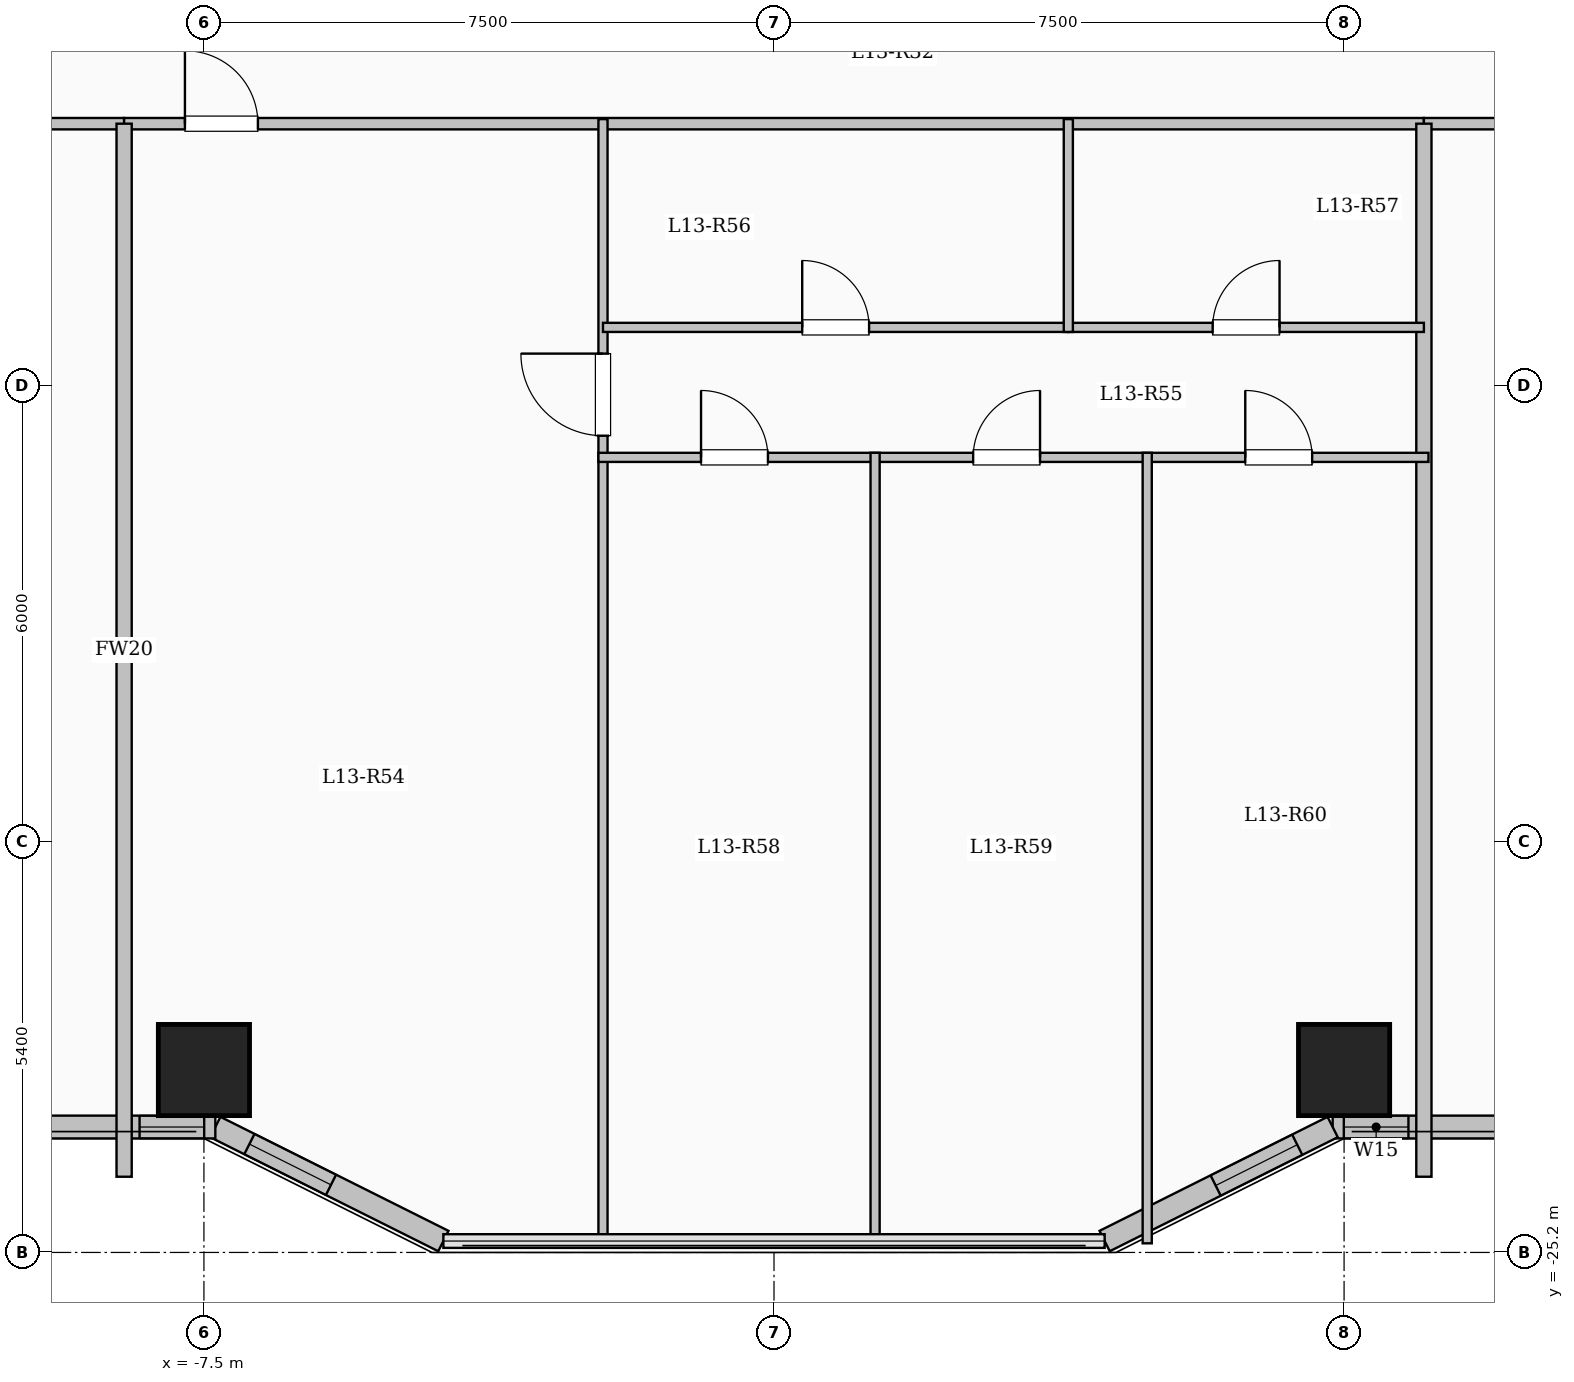
"""IFC4 building model, lengths in metres.
Left out: names, types, materials, properties, quantities, classifications, styles, units other than length and angle.
Written with IfcOpenShell. Run it as: python <this file> out.ifc"""

import sys

from ifc_helpers import new_model, si_unit, direction, frame, frame_2d, origin, origin_2d, place, context, subcontext, project, spatial, rectangle, extrude, element, fill, save


model = new_model("IFC4")
c1 = context("Model", 3, precision=1e-05, world=origin(), true_north=direction((0.0, 1.0)))
c2 = subcontext(c1, "Body", "Model", "MODEL_VIEW")
j1 = project(units=[si_unit("LENGTHUNIT", "METRE"), si_unit("PLANEANGLEUNIT", "RADIAN")], contexts=[c1])
p1 = place(None, origin())
s1 = spatial("IfcSite", under=j1, at=p1, CompositionType="ELEMENT")
p2 = place(p1, origin())
s2 = spatial("IfcBuilding", under=s1, at=p2, CompositionType="ELEMENT")
p3 = place(p2, frame((0.0, 0.0, 50.8)))
s3 = spatial("IfcBuildingStorey", under=s2, at=p3, CompositionType="ELEMENT", Elevation=50.8)
for number, where, z_axis, x_axis in (
    (1, (-7.5, -22.8, 0.0), (0.0, 0.0, 1.0), (1.0, 0.0, 0.0)),
    (2, (7.5, -22.8, 0.0), (0.0, 0.0, 1.0), (1.0, 0.0, 0.0)),
):
    element("IfcColumn", number, at=place(p3, frame(where, z_axis=z_axis, x_axis=x_axis)), inside=s3, PredefinedType="COLUMN", context=c2, shape_type="SweptSolid", body=[
        extrude(rectangle(XDim=1.2, YDim=1.2, at=origin_2d()), origin(), (0.0, 0.0, 1.0), 3.35),
    ])
p4 = place(p3, frame((22.65, -23.55, 0.0), z_axis=(0.0, 0.0, 1.0), x_axis=(-1.0, 0.0, 0.0)))
e3 = element("IfcWall", 3, at=p4, inside=s3, PredefinedType="SOLIDWALL", context=c2, shape_type="SweptSolid", body=[
    extrude(rectangle(XDim=15.3, YDim=0.3, at=frame_2d((7.65, 0.0))), origin(), (0.0, 0.0, 1.0), 3.1),
])
p5 = place(p4, frame((1.007, 0.0, 0.9)))
e4 = element("IfcOpeningElement", 4, at=p5, cuts=e3, PredefinedType="OPENING", context=c2, shape_type="SweptSolid", body=[
    extrude(rectangle(XDim=2.0, YDim=1.7, at=frame_2d((1.0, 0.85))), frame((0.0, 0.16, 0.0), z_axis=(0.0, -1.0, 0.0), x_axis=(1.0, 0.0, 0.0)), (0.0, 0.0, 1.0), 0.32),
])
p6 = place(p4, frame((5.496, 0.0, 0.9)))
e5 = element("IfcOpeningElement", 5, at=p6, cuts=e3, PredefinedType="OPENING", context=c2, shape_type="SweptSolid", body=[
    extrude(rectangle(XDim=2.0, YDim=1.7, at=frame_2d((1.0, 0.85))), frame((0.0, 0.16, 0.0), z_axis=(0.0, -1.0, 0.0), x_axis=(1.0, 0.0, 0.0)), (0.0, 0.0, 1.0), 0.32),
])
p7 = place(p4, frame((10.563, 0.0, 0.9)))
e6 = element("IfcOpeningElement", 6, at=p7, cuts=e3, PredefinedType="OPENING", context=c2, shape_type="SweptSolid", body=[
    extrude(rectangle(XDim=2.0, YDim=1.7, at=frame_2d((1.0, 0.85))), frame((0.0, 0.16, 0.0), z_axis=(0.0, -1.0, 0.0), x_axis=(1.0, 0.0, 0.0)), (0.0, 0.0, 1.0), 0.32),
])
p8 = place(p4, frame((14.303, 0.0, 0.95)))
e7 = element("IfcOpeningElement", 7, at=p8, cuts=e3, PredefinedType="OPENING", context=c2, shape_type="SweptSolid", body=[
    extrude(rectangle(XDim=0.85, YDim=1.5, at=frame_2d((0.425, 0.75))), frame((0.0, 0.16, 0.0), z_axis=(0.0, -1.0, 0.0), x_axis=(1.0, 0.0, 0.0)), (0.0, 0.0, 1.0), 0.32),
])
p9 = place(p3, frame((7.35, -23.55, 0.0), z_axis=(0.0, 0.0, 1.0), x_axis=(-0.894427191, -0.4472135955, 0.0)))
e8 = element("IfcWall", 8, at=p9, inside=s3, PredefinedType="SOLIDWALL", context=c2, shape_type="SweptSolid", body=[
    extrude(rectangle(XDim=3.354, YDim=0.3, at=frame_2d((1.677, 0.0))), origin(), (0.0, 0.0, 1.0), 3.1),
])
p10 = place(p9, frame((0.521, 0.0, 0.95)))
e9 = element("IfcOpeningElement", 9, at=p10, cuts=e8, PredefinedType="OPENING", context=c2, shape_type="SweptSolid", body=[
    extrude(rectangle(XDim=1.2, YDim=1.5, at=frame_2d((0.6, 0.75))), frame((0.0, 0.16, 0.0), z_axis=(0.0, -1.0, 0.0), x_axis=(1.0, 0.0, 0.0)), (0.0, 0.0, 1.0), 0.32),
])
p11 = place(p3, frame((-4.35, -25.05, 0.0), z_axis=(0.0, 0.0, 1.0), x_axis=(-0.894427191, 0.4472135955, 0.0)))
e10 = element("IfcWall", 10, at=p11, inside=s3, PredefinedType="SOLIDWALL", context=c2, shape_type="SweptSolid", body=[
    extrude(rectangle(XDim=3.354, YDim=0.3, at=frame_2d((1.677, 0.0))), origin(), (0.0, 0.0, 1.0), 3.1),
])
p12 = place(p11, frame((1.653, 0.0, 0.95)))
e11 = element("IfcOpeningElement", 11, at=p12, cuts=e10, PredefinedType="OPENING", context=c2, shape_type="SweptSolid", body=[
    extrude(rectangle(XDim=1.2, YDim=1.5, at=frame_2d((0.6, 0.75))), frame((0.0, 0.16, 0.0), z_axis=(0.0, -1.0, 0.0), x_axis=(1.0, 0.0, 0.0)), (0.0, 0.0, 1.0), 0.32),
])
p13 = place(p3, frame((-7.35, -23.55, 0.0), z_axis=(0.0, 0.0, 1.0), x_axis=(-1.0, 0.0, 0.0)))
e12 = element("IfcWall", 12, at=p13, inside=s3, PredefinedType="SOLIDWALL", context=c2, shape_type="SweptSolid", body=[
    extrude(rectangle(XDim=15.3, YDim=0.3, at=frame_2d((7.65, 0.0))), origin(), (0.0, 0.0, 1.0), 3.1),
])
p14 = place(p13, frame((0.147, 0.0, 0.95)))
e13 = element("IfcOpeningElement", 13, at=p14, cuts=e12, PredefinedType="OPENING", context=c2, shape_type="SweptSolid", body=[
    extrude(rectangle(XDim=0.85, YDim=1.5, at=frame_2d((0.425, 0.75))), frame((0.0, 0.16, 0.0), z_axis=(0.0, -1.0, 0.0), x_axis=(1.0, 0.0, 0.0)), (0.0, 0.0, 1.0), 0.32),
])
p15 = place(p13, frame((2.26, 0.0, 0.9)))
e14 = element("IfcOpeningElement", 14, at=p15, cuts=e12, PredefinedType="OPENING", context=c2, shape_type="SweptSolid", body=[
    extrude(rectangle(XDim=1.8, YDim=1.65, at=frame_2d((0.9, 0.825))), frame((0.0, 0.16, 0.0), z_axis=(0.0, -1.0, 0.0), x_axis=(1.0, 0.0, 0.0)), (0.0, 0.0, 1.0), 0.32),
])
p16 = place(p13, frame((6.65, 0.0, 0.9)))
e15 = element("IfcOpeningElement", 15, at=p16, cuts=e12, PredefinedType="OPENING", context=c2, shape_type="SweptSolid", body=[
    extrude(rectangle(XDim=2.0, YDim=1.7, at=frame_2d((1.0, 0.85))), frame((0.0, 0.16, 0.0), z_axis=(0.0, -1.0, 0.0), x_axis=(1.0, 0.0, 0.0)), (0.0, 0.0, 1.0), 0.32),
])
p17 = place(p13, frame((11.717, 0.0, 0.9)))
e16 = element("IfcOpeningElement", 16, at=p17, cuts=e12, PredefinedType="OPENING", context=c2, shape_type="SweptSolid", body=[
    extrude(rectangle(XDim=2.0, YDim=1.7, at=frame_2d((1.0, 0.85))), frame((0.0, 0.16, 0.0), z_axis=(0.0, -1.0, 0.0), x_axis=(1.0, 0.0, 0.0)), (0.0, 0.0, 1.0), 0.32),
])
p18 = place(p3, frame((-22.55, -10.35, 0.0), z_axis=(0.0, 0.0, 1.0), x_axis=(1.0, 0.0, 0.0)))
e17 = element("IfcWall", 17, at=p18, inside=s3, PredefinedType="PARTITIONING", context=c2, shape_type="SweptSolid", body=[
    extrude(rectangle(XDim=14.0, YDim=0.15, at=frame_2d((7.0, 0.0))), origin(), (0.0, 0.0, 1.0), 3.1),
])
p19 = place(p18, frame((2.006, 0.0, 0.0)))
e18 = element("IfcOpeningElement", 18, at=p19, cuts=e17, PredefinedType="OPENING", context=c2, shape_type="SweptSolid", body=[
    extrude(rectangle(XDim=0.95, YDim=2.15, at=frame_2d((0.475, 1.075))), frame((0.0, 0.085, 0.0), z_axis=(0.0, -1.0, 0.0), x_axis=(1.0, 0.0, 0.0)), (0.0, 0.0, 1.0), 0.17),
])
p20 = place(p18, frame((7.058, 0.0, 0.0)))
e19 = element("IfcOpeningElement", 19, at=p20, cuts=e17, PredefinedType="OPENING", context=c2, shape_type="SweptSolid", body=[
    extrude(rectangle(XDim=0.95, YDim=2.15, at=frame_2d((0.475, 1.075))), frame((0.0, 0.085, 0.0), z_axis=(0.0, -1.0, 0.0), x_axis=(1.0, 0.0, 0.0)), (0.0, 0.0, 1.0), 0.17),
])
p21 = place(p18, frame((11.552, 0.0, 0.0)))
e20 = element("IfcOpeningElement", 20, at=p21, cuts=e17, PredefinedType="OPENING", context=c2, shape_type="SweptSolid", body=[
    extrude(rectangle(XDim=0.95, YDim=2.15, at=frame_2d((0.475, 1.075))), frame((0.0, 0.085, 0.0), z_axis=(0.0, -1.0, 0.0), x_axis=(1.0, 0.0, 0.0)), (0.0, 0.0, 1.0), 0.17),
])
p22 = place(p3, frame((-8.55, -10.35, 0.0), z_axis=(0.0, 0.0, 1.0), x_axis=(1.0, 0.0, 0.0)))
e21 = element("IfcWall", 21, at=p22, inside=s3, PredefinedType="PARTITIONING", context=c2, shape_type="SweptSolid", body=[
    extrude(rectangle(XDim=17.1, YDim=0.15, at=frame_2d((8.55, 0.0))), origin(), (0.0, 0.0, 1.0), 3.1),
])
p23 = place(p22, frame((0.8, 0.0, 0.0)))
e22 = element("IfcOpeningElement", 22, at=p23, cuts=e21, PredefinedType="OPENING", context=c2, shape_type="SweptSolid", body=[
    extrude(rectangle(XDim=0.96, YDim=2.15, at=frame_2d((0.48, 1.075))), frame((0.0, 0.085, 0.0), z_axis=(0.0, -1.0, 0.0), x_axis=(1.0, 0.0, 0.0)), (0.0, 0.0, 1.0), 0.17),
])
p24 = place(p3, frame((8.55, -10.35, 0.0), z_axis=(0.0, 0.0, 1.0), x_axis=(1.0, 0.0, 0.0)))
e23 = element("IfcWall", 23, at=p24, inside=s3, PredefinedType="PARTITIONING", context=c2, shape_type="SweptSolid", body=[
    extrude(rectangle(XDim=14.0, YDim=0.15, at=frame_2d((7.0, 0.0))), origin(), (0.0, 0.0, 1.0), 3.1),
])
p25 = place(p24, frame((2.056, 0.0, 0.0)))
e24 = element("IfcOpeningElement", 24, at=p25, cuts=e23, PredefinedType="OPENING", context=c2, shape_type="SweptSolid", body=[
    extrude(rectangle(XDim=0.95, YDim=2.15, at=frame_2d((0.475, 1.075))), frame((0.0, 0.085, 0.0), z_axis=(0.0, -1.0, 0.0), x_axis=(1.0, 0.0, 0.0)), (0.0, 0.0, 1.0), 0.17),
])
p26 = place(p24, frame((7.108, 0.0, 0.0)))
e25 = element("IfcOpeningElement", 25, at=p26, cuts=e23, PredefinedType="OPENING", context=c2, shape_type="SweptSolid", body=[
    extrude(rectangle(XDim=0.95, YDim=2.15, at=frame_2d((0.475, 1.075))), frame((0.0, 0.085, 0.0), z_axis=(0.0, -1.0, 0.0), x_axis=(1.0, 0.0, 0.0)), (0.0, 0.0, 1.0), 0.17),
])
p27 = place(p24, frame((11.602, 0.0, 0.0)))
e26 = element("IfcOpeningElement", 26, at=p27, cuts=e23, PredefinedType="OPENING", context=c2, shape_type="SweptSolid", body=[
    extrude(rectangle(XDim=0.95, YDim=2.15, at=frame_2d((0.475, 1.075))), frame((0.0, 0.085, 0.0), z_axis=(0.0, -1.0, 0.0), x_axis=(1.0, 0.0, 0.0)), (0.0, 0.0, 1.0), 0.17),
])
for number, where, z_axis, x_axis in (
    (27, (-8.55, -24.204, 0.0), (0.0, 0.0, 1.0), (0.0, 1.0, 0.0)),
    (28, (8.55, -24.204, 0.0), (0.0, 0.0, 1.0), (0.0, 1.0, 0.0)),
):
    element("IfcWall", number, at=place(p3, frame(where, z_axis=z_axis, x_axis=x_axis)), inside=s3, PredefinedType="SOLIDWALL", context=c2, shape_type="SweptSolid", body=[
        extrude(rectangle(XDim=13.854, YDim=0.2, at=frame_2d((6.927, 0.0))), origin(), (0.0, 0.0, 1.0), 3.1),
    ])
p28 = place(p3, frame((-2.25, -25.08, 0.0), z_axis=(0.0, 0.0, 1.0), x_axis=(0.0, 1.0, 0.0)))
e29 = element("IfcWall", 29, at=p28, inside=s3, PredefinedType="PARTITIONING", context=c2, shape_type="SweptSolid", body=[
    extrude(rectangle(XDim=14.79, YDim=0.12, at=frame_2d((7.395, 0.0))), origin(), (0.0, 0.0, 1.0), 3.1),
])
p29 = place(p28, frame((10.625, 0.0, 0.0)))
e30 = element("IfcOpeningElement", 30, at=p29, cuts=e29, PredefinedType="OPENING", context=c2, shape_type="SweptSolid", body=[
    extrude(rectangle(XDim=1.08, YDim=2.15, at=frame_2d((0.54, 1.075))), frame((0.0, 0.07, 0.0), z_axis=(0.0, -1.0, 0.0), x_axis=(1.0, 0.0, 0.0)), (0.0, 0.0, 1.0), 0.14),
])
p30 = place(p3, frame((-2.25, -13.03, 0.0), z_axis=(0.0, 0.0, 1.0), x_axis=(1.0, 0.0, 0.0)))
e31 = element("IfcWall", 31, at=p30, inside=s3, PredefinedType="PARTITIONING", context=c2, shape_type="SweptSolid", body=[
    extrude(rectangle(XDim=6.122, YDim=0.12, at=frame_2d((3.061, 0.0))), origin(), (0.0, 0.0, 1.0), 2.585),
])
p31 = place(p30, frame((2.621, 0.0, 0.0)))
e32 = element("IfcOpeningElement", 32, at=p31, cuts=e31, PredefinedType="OPENING", context=c2, shape_type="SweptSolid", body=[
    extrude(rectangle(XDim=0.88, YDim=2.1, at=frame_2d((0.44, 1.05))), frame((0.0, 0.07, 0.0), z_axis=(0.0, -1.0, 0.0), x_axis=(1.0, 0.0, 0.0)), (0.0, 0.0, 1.0), 0.14),
])
p32 = place(p3, frame((3.872, -13.03, 0.0), z_axis=(0.0, 0.0, 1.0), x_axis=(1.0, 0.0, 0.0)))
e33 = element("IfcWall", 33, at=p32, inside=s3, PredefinedType="PARTITIONING", context=c2, shape_type="SweptSolid", body=[
    extrude(rectangle(XDim=4.678, YDim=0.12, at=frame_2d((2.339, 0.0))), origin(), (0.0, 0.0, 1.0), 2.585),
])
p33 = place(p32, frame((1.899, 0.0, 0.0)))
e34 = element("IfcOpeningElement", 34, at=p33, cuts=e33, PredefinedType="OPENING", context=c2, shape_type="SweptSolid", body=[
    extrude(rectangle(XDim=0.88, YDim=2.1, at=frame_2d((0.44, 1.05))), frame((0.0, 0.07, 0.0), z_axis=(0.0, -1.0, 0.0), x_axis=(1.0, 0.0, 0.0)), (0.0, 0.0, 1.0), 0.14),
])
p34 = place(p3, frame((-2.31, -14.74, 0.0), z_axis=(0.0, 0.0, 1.0), x_axis=(1.0, 0.0, 0.0)))
e35 = element("IfcWall", 35, at=p34, inside=s3, PredefinedType="PARTITIONING", context=c2, shape_type="SweptSolid", body=[
    extrude(rectangle(XDim=10.92, YDim=0.12, at=frame_2d((5.46, 0.0))), origin(), (0.0, 0.0, 1.0), 2.585),
])
p35 = place(p34, frame((1.35, 0.0, 0.0)))
e36 = element("IfcOpeningElement", 36, at=p35, cuts=e35, PredefinedType="OPENING", context=c2, shape_type="SweptSolid", body=[
    extrude(rectangle(XDim=0.88, YDim=2.1, at=frame_2d((0.44, 1.05))), frame((0.0, 0.07, 0.0), z_axis=(0.0, -1.0, 0.0), x_axis=(1.0, 0.0, 0.0)), (0.0, 0.0, 1.0), 0.14),
])
p36 = place(p34, frame((4.93, 0.0, 0.0)))
e37 = element("IfcOpeningElement", 37, at=p36, cuts=e35, PredefinedType="OPENING", context=c2, shape_type="SweptSolid", body=[
    extrude(rectangle(XDim=0.88, YDim=2.1, at=frame_2d((0.44, 1.05))), frame((0.0, 0.07, 0.0), z_axis=(0.0, -1.0, 0.0), x_axis=(1.0, 0.0, 0.0)), (0.0, 0.0, 1.0), 0.14),
])
p37 = place(p34, frame((8.51, 0.0, 0.0)))
e38 = element("IfcOpeningElement", 38, at=p37, cuts=e35, PredefinedType="OPENING", context=c2, shape_type="SweptSolid", body=[
    extrude(rectangle(XDim=0.88, YDim=2.1, at=frame_2d((0.44, 1.05))), frame((0.0, 0.07, 0.0), z_axis=(0.0, -1.0, 0.0), x_axis=(1.0, 0.0, 0.0)), (0.0, 0.0, 1.0), 0.14),
])
p38 = place(p3, frame((3.872, -13.09, 0.0), z_axis=(0.0, 0.0, 1.0), x_axis=(0.0, 1.0, 0.0)))
e39 = element("IfcWall", 39, at=p38, inside=s3, PredefinedType="PARTITIONING", context=c2, shape_type="SweptSolid", body=[
    extrude(rectangle(XDim=2.8, YDim=0.12, at=frame_2d((1.4, 0.0))), origin(), (0.0, 0.0, 1.0), 3.1),
])
for number, where, z_axis, x_axis in (
    (40, (1.33, -25.08, 0.0), (0.0, 0.0, 1.0), (0.0, 1.0, 0.0)),
    (41, (4.91, -25.08, 0.0), (0.0, 0.0, 1.0), (0.0, 1.0, 0.0)),
):
    element("IfcWall", number, at=place(p3, frame(where, z_axis=z_axis, x_axis=x_axis)), inside=s3, PredefinedType="PARTITIONING", context=c2, shape_type="SweptSolid", body=[
        extrude(rectangle(XDim=10.4, YDim=0.12, at=frame_2d((5.2, 0.0))), origin(), (0.0, 0.0, 1.0), 3.1),
    ])
p39 = place(p8, origin())
e42 = element("IfcWindow", 42, at=p39, inside=s3, PartitioningType="SINGLE_PANEL", PredefinedType="WINDOW", context=c2, shape_type="SweptSolid", body=[
    extrude(rectangle(XDim=0.85, YDim=1.5, at=frame_2d((0.425, 0.75))), frame((0.0, 0.03, 0.0), z_axis=(0.0, -1.0, 0.0), x_axis=(1.0, 0.0, 0.0)), (0.0, 0.0, 1.0), 0.06),
])
fill(e7, e42)
p40 = place(p10, origin())
e43 = element("IfcWindow", 43, at=p40, inside=s3, PartitioningType="SINGLE_PANEL", PredefinedType="WINDOW", context=c2, shape_type="SweptSolid", body=[
    extrude(rectangle(XDim=1.2, YDim=1.5, at=frame_2d((0.6, 0.75))), frame((0.0, 0.03, 0.0), z_axis=(0.0, -1.0, 0.0), x_axis=(1.0, 0.0, 0.0)), (0.0, 0.0, 1.0), 0.06),
])
fill(e9, e43)
p41 = place(p12, origin())
e44 = element("IfcWindow", 44, at=p41, inside=s3, PartitioningType="SINGLE_PANEL", PredefinedType="WINDOW", context=c2, shape_type="SweptSolid", body=[
    extrude(rectangle(XDim=1.2, YDim=1.5, at=frame_2d((0.6, 0.75))), frame((0.0, 0.03, 0.0), z_axis=(0.0, -1.0, 0.0), x_axis=(1.0, 0.0, 0.0)), (0.0, 0.0, 1.0), 0.06),
])
fill(e11, e44)
p42 = place(p14, origin())
e45 = element("IfcWindow", 45, at=p42, inside=s3, PartitioningType="SINGLE_PANEL", PredefinedType="WINDOW", context=c2, shape_type="SweptSolid", body=[
    extrude(rectangle(XDim=0.85, YDim=1.5, at=frame_2d((0.425, 0.75))), frame((0.0, 0.03, 0.0), z_axis=(0.0, -1.0, 0.0), x_axis=(1.0, 0.0, 0.0)), (0.0, 0.0, 1.0), 0.06),
])
fill(e13, e45)
p43 = place(p23, origin())
e46 = element("IfcDoor", 46, at=p43, inside=s3, OperationType="SINGLE_SWING_LEFT", PredefinedType="DOOR", context=c2, shape_type="SweptSolid", body=[
    extrude(rectangle(XDim=0.96, YDim=2.15, at=frame_2d((0.48, 1.075))), frame((0.0, 0.025, 0.0), z_axis=(0.0, -1.0, 0.0), x_axis=(1.0, 0.0, 0.0)), (0.0, 0.0, 1.0), 0.05),
])
fill(e22, e46)
p44 = place(p29, origin())
e47 = element("IfcDoor", 47, at=p44, inside=s3, OperationType="SINGLE_SWING_RIGHT", PredefinedType="DOOR", context=c2, shape_type="SweptSolid", body=[
    extrude(rectangle(XDim=1.08, YDim=2.15, at=frame_2d((0.54, 1.075))), frame((0.0, 0.025, 0.0), z_axis=(0.0, -1.0, 0.0), x_axis=(1.0, 0.0, 0.0)), (0.0, 0.0, 1.0), 0.05),
])
fill(e30, e47)
p45 = place(p31, origin())
e48 = element("IfcDoor", 48, at=p45, inside=s3, OperationType="SINGLE_SWING_LEFT", PredefinedType="DOOR", context=c2, shape_type="SweptSolid", body=[
    extrude(rectangle(XDim=0.88, YDim=2.1, at=frame_2d((0.44, 1.05))), frame((0.0, 0.025, 0.0), z_axis=(0.0, -1.0, 0.0), x_axis=(1.0, 0.0, 0.0)), (0.0, 0.0, 1.0), 0.05),
])
fill(e32, e48)
p46 = place(p33, origin())
e49 = element("IfcDoor", 49, at=p46, inside=s3, OperationType="SINGLE_SWING_RIGHT", PredefinedType="DOOR", context=c2, shape_type="SweptSolid", body=[
    extrude(rectangle(XDim=0.88, YDim=2.1, at=frame_2d((0.44, 1.05))), frame((0.0, 0.025, 0.0), z_axis=(0.0, -1.0, 0.0), x_axis=(1.0, 0.0, 0.0)), (0.0, 0.0, 1.0), 0.05),
])
fill(e34, e49)
p47 = place(p35, origin())
e50 = element("IfcDoor", 50, at=p47, inside=s3, OperationType="SINGLE_SWING_LEFT", PredefinedType="DOOR", context=c2, shape_type="SweptSolid", body=[
    extrude(rectangle(XDim=0.88, YDim=2.1, at=frame_2d((0.44, 1.05))), frame((0.0, 0.025, 0.0), z_axis=(0.0, -1.0, 0.0), x_axis=(1.0, 0.0, 0.0)), (0.0, 0.0, 1.0), 0.05),
])
fill(e36, e50)
p48 = place(p36, origin())
e51 = element("IfcDoor", 51, at=p48, inside=s3, OperationType="SINGLE_SWING_RIGHT", PredefinedType="DOOR", context=c2, shape_type="SweptSolid", body=[
    extrude(rectangle(XDim=0.88, YDim=2.1, at=frame_2d((0.44, 1.05))), frame((0.0, 0.025, 0.0), z_axis=(0.0, -1.0, 0.0), x_axis=(1.0, 0.0, 0.0)), (0.0, 0.0, 1.0), 0.05),
])
fill(e37, e51)
p49 = place(p37, origin())
e52 = element("IfcDoor", 52, at=p49, inside=s3, OperationType="SINGLE_SWING_LEFT", PredefinedType="DOOR", context=c2, shape_type="SweptSolid", body=[
    extrude(rectangle(XDim=0.88, YDim=2.1, at=frame_2d((0.44, 1.05))), frame((0.0, 0.025, 0.0), z_axis=(0.0, -1.0, 0.0), x_axis=(1.0, 0.0, 0.0)), (0.0, 0.0, 1.0), 0.05),
])
fill(e38, e52)
save(model, sys.argv[1])
